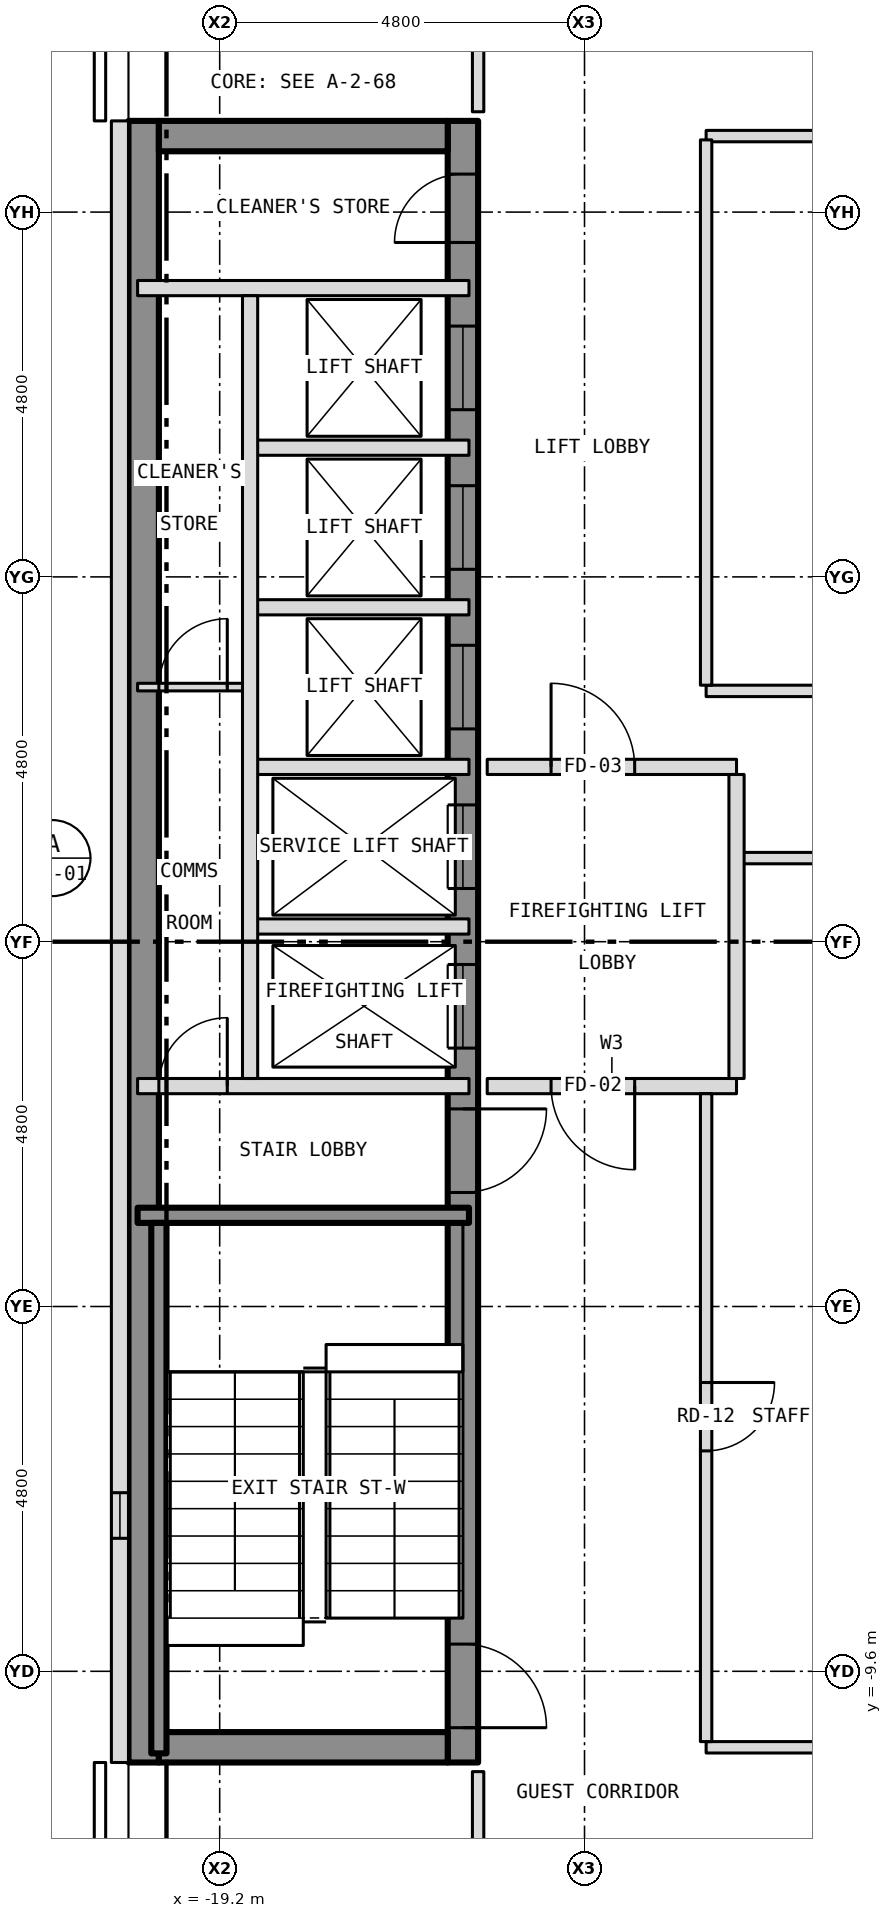
"""IFC4 building model, lengths in metres.
Left out: names, types, materials, properties, quantities, classifications, styles, units other than length and angle.
Written with IfcOpenShell. Run it as: python <this file> out.ifc"""

import sys

from ifc_helpers import new_model, si_unit, direction, frame, frame_2d, origin, place, context, subcontext, project, spatial, rectangle, extrude, element, fill, save


model = new_model("IFC4")
c1 = context("Model", 3, precision=1e-05, world=origin(), true_north=direction((0.0, 1.0)))
c2 = subcontext(c1, "Body", "Model", "MODEL_VIEW")
j1 = project(units=[si_unit("LENGTHUNIT", "METRE"), si_unit("PLANEANGLEUNIT", "RADIAN")], contexts=[c1])
p1 = place(None, origin())
s1 = spatial("IfcSite", under=j1, at=p1, CompositionType="ELEMENT")
p2 = place(p1, origin())
s2 = spatial("IfcBuilding", under=s1, at=p2, CompositionType="ELEMENT")
p3 = place(p2, frame((0.0, 0.0, 248.0)))
s3 = spatial("IfcBuildingStorey", under=s2, at=p3, CompositionType="ELEMENT", Elevation=248.0)
p4 = place(p3, frame((-16.0, -10.8, 0.0), z_axis=(0.0, 0.0, 1.0), x_axis=(0.0, 1.0, 0.0)))
e1 = element("IfcWall", 1, at=p4, inside=s3, PredefinedType="SHEAR", context=c2, shape_type="SweptSolid", body=[
    extrude(rectangle(XDim=21.6, YDim=0.4, at=frame_2d((10.8, 0.0))), origin(), (0.0, 0.0, 1.0), 3.25),
])
p5 = place(p4, frame((9.4, 0.0, 0.0)))
e2 = element("IfcOpeningElement", 2, at=p5, cuts=e1, PredefinedType="OPENING", context=c2, shape_type="SweptSolid", body=[
    extrude(rectangle(XDim=1.1, YDim=2.1, at=frame_2d((0.55, 1.05))), frame((0.0, 0.212, 0.0), z_axis=(0.0, -1.0, 0.0), x_axis=(1.0, 0.0, 0.0)), (0.0, 0.0, 1.0), 0.424),
])
p6 = place(p4, frame((11.5, 0.0, 0.0)))
e3 = element("IfcOpeningElement", 3, at=p6, cuts=e1, PredefinedType="OPENING", context=c2, shape_type="SweptSolid", body=[
    extrude(rectangle(XDim=1.1, YDim=2.1, at=frame_2d((0.55, 1.05))), frame((0.0, 0.212, 0.0), z_axis=(0.0, -1.0, 0.0), x_axis=(1.0, 0.0, 0.0)), (0.0, 0.0, 1.0), 0.424),
])
p7 = place(p4, frame((13.6, 0.0, 0.0)))
e4 = element("IfcOpeningElement", 4, at=p7, cuts=e1, PredefinedType="OPENING", context=c2, shape_type="SweptSolid", body=[
    extrude(rectangle(XDim=1.1, YDim=2.1, at=frame_2d((0.55, 1.05))), frame((0.0, 0.212, 0.0), z_axis=(0.0, -1.0, 0.0), x_axis=(1.0, 0.0, 0.0)), (0.0, 0.0, 1.0), 0.424),
])
p8 = place(p4, frame((15.7, 0.0, 0.0)))
e5 = element("IfcOpeningElement", 5, at=p8, cuts=e1, PredefinedType="OPENING", context=c2, shape_type="SweptSolid", body=[
    extrude(rectangle(XDim=1.1, YDim=2.1, at=frame_2d((0.55, 1.05))), frame((0.0, 0.212, 0.0), z_axis=(0.0, -1.0, 0.0), x_axis=(1.0, 0.0, 0.0)), (0.0, 0.0, 1.0), 0.424),
])
p9 = place(p4, frame((17.8, 0.0, 0.0)))
e6 = element("IfcOpeningElement", 6, at=p9, cuts=e1, PredefinedType="OPENING", context=c2, shape_type="SweptSolid", body=[
    extrude(rectangle(XDim=1.1, YDim=2.1, at=frame_2d((0.55, 1.05))), frame((0.0, 0.212, 0.0), z_axis=(0.0, -1.0, 0.0), x_axis=(1.0, 0.0, 0.0)), (0.0, 0.0, 1.0), 0.424),
])
p10 = place(p4, frame((0.458, 0.0, 0.0)))
e7 = element("IfcOpeningElement", 7, at=p10, cuts=e1, PredefinedType="OPENING", context=c2, shape_type="SweptSolid", body=[
    extrude(rectangle(XDim=1.1, YDim=2.1, at=frame_2d((0.55, 1.05))), frame((0.0, 0.212, 0.0), z_axis=(0.0, -1.0, 0.0), x_axis=(1.0, 0.0, 0.0)), (0.0, 0.0, 1.0), 0.424),
])
p11 = place(p4, frame((7.5, 0.0, 0.0)))
e8 = element("IfcOpeningElement", 8, at=p11, cuts=e1, PredefinedType="OPENING", context=c2, shape_type="SweptSolid", body=[
    extrude(rectangle(XDim=1.1, YDim=2.1, at=frame_2d((0.55, 1.05))), frame((0.0, 0.212, 0.0), z_axis=(0.0, -1.0, 0.0), x_axis=(1.0, 0.0, 0.0)), (0.0, 0.0, 1.0), 0.424),
])
p12 = place(p4, frame((20.0, 0.0, 0.0)))
e9 = element("IfcOpeningElement", 9, at=p12, cuts=e1, PredefinedType="OPENING", context=c2, shape_type="SweptSolid", body=[
    extrude(rectangle(XDim=0.9, YDim=2.1, at=frame_2d((0.45, 1.05))), frame((0.0, 0.212, 0.0), z_axis=(0.0, -1.0, 0.0), x_axis=(1.0, 0.0, 0.0)), (0.0, 0.0, 1.0), 0.424),
])
p13 = place(p3, frame((-20.2, -10.8, 0.0), z_axis=(0.0, 0.0, 1.0), x_axis=(0.0, 1.0, 0.0)))
e10 = element("IfcWall", 10, at=p13, inside=s3, PredefinedType="SHEAR", context=c2, shape_type="SweptSolid", body=[
    extrude(rectangle(XDim=21.6, YDim=0.4, at=frame_2d((10.8, 0.0))), origin(), (0.0, 0.0, 1.0), 3.25),
])
for number, where, z_axis, x_axis in (
    (11, (-20.0, 10.6, 0.0), (0.0, 0.0, 1.0), (1.0, 0.0, 0.0)),
    (12, (-20.0, -10.6, 0.0), (0.0, 0.0, 1.0), (1.0, 0.0, 0.0)),
):
    element("IfcWall", number, at=place(p3, frame(where, z_axis=z_axis, x_axis=x_axis)), inside=s3, PredefinedType="SHEAR", context=c2, shape_type="SweptSolid", body=[
        extrude(rectangle(XDim=3.8, YDim=0.4, at=frame_2d((1.9, 0.0))), origin(), (0.0, 0.0, 1.0), 3.25),
    ])
p14 = place(p3, frame((-20.512, 10.8, 0.0), z_axis=(0.0, 0.0, 1.0), x_axis=(0.0, -1.0, 0.0)))
e13 = element("IfcWall", 13, at=p14, inside=s3, PredefinedType="SOLIDWALL", context=c2, shape_type="SweptSolid", body=[
    extrude(rectangle(XDim=21.6, YDim=0.225, at=frame_2d((10.8, 0.0))), origin(), (0.0, 0.0, 1.0), 3.5),
])
p15 = place(p14, frame((18.05, 0.0, 1.0)))
e14 = element("IfcOpeningElement", 14, at=p15, cuts=e13, PredefinedType="OPENING", context=c2, shape_type="SweptSolid", body=[
    extrude(rectangle(XDim=0.6, YDim=1.5, at=frame_2d((0.3, 0.75))), frame((0.0, 0.125, 0.0), z_axis=(0.0, -1.0, 0.0), x_axis=(1.0, 0.0, 0.0)), (0.0, 0.0, 1.0), 0.249),
])
p16 = place(p3, frame((-12.8, -10.6, 0.0), z_axis=(0.0, 0.0, 1.0), x_axis=(1.0, 0.0, 0.0)))
e15 = element("IfcWall", 15, at=p16, inside=s3, PredefinedType="PARTITIONING", context=c2, shape_type="SweptSolid", body=[
    extrude(rectangle(XDim=20.3, YDim=0.15, at=frame_2d((10.15, 0.0))), origin(), (0.0, 0.0, 1.0), 3.35),
])
p17 = place(p16, frame((11.3, 0.0, 0.0)))
e16 = element("IfcOpeningElement", 16, at=p17, cuts=e15, PredefinedType="OPENING", context=c2, shape_type="SweptSolid", body=[
    extrude(rectangle(XDim=0.9, YDim=2.1, at=frame_2d((0.45, 1.05))), frame((0.0, 0.087, 0.0), z_axis=(0.0, -1.0, 0.0), x_axis=(1.0, 0.0, 0.0)), (0.0, 0.0, 1.0), 0.174),
])
p18 = place(p3, frame((-20.28, -3.6, 0.0), z_axis=(0.0, 0.0, 1.0), x_axis=(1.0, 0.0, 0.0)))
e17 = element("IfcWall", 17, at=p18, inside=s3, PredefinedType="SHEAR", context=c2, shape_type="SweptSolid", body=[
    extrude(rectangle(XDim=4.36, YDim=0.2, at=frame_2d((2.18, 0.0))), origin(), (0.0, 0.0, 1.0), 3.25),
])
p19 = place(p3, frame((-20.28, -1.9, 0.0), z_axis=(0.0, 0.0, 1.0), x_axis=(1.0, 0.0, 0.0)))
e18 = element("IfcWall", 18, at=p19, inside=s3, PredefinedType="PARTITIONING", context=c2, shape_type="SweptSolid", body=[
    extrude(rectangle(XDim=4.36, YDim=0.2, at=frame_2d((2.18, 0.0))), origin(), (0.0, 0.0, 1.0), 3.25),
])
p20 = place(p19, frame((0.28, 0.0, 0.0)))
e19 = element("IfcOpeningElement", 19, at=p20, cuts=e18, PredefinedType="OPENING", context=c2, shape_type="SweptSolid", body=[
    extrude(rectangle(XDim=0.9, YDim=2.1, at=frame_2d((0.45, 1.05))), frame((0.0, 0.112, 0.0), z_axis=(0.0, -1.0, 0.0), x_axis=(1.0, 0.0, 0.0)), (0.0, 0.0, 1.0), 0.224),
])
p21 = place(p3, frame((-15.68, -1.9, 0.0), z_axis=(0.0, 0.0, 1.0), x_axis=(1.0, 0.0, 0.0)))
e20 = element("IfcWall", 20, at=p21, inside=s3, PredefinedType="PARTITIONING", context=c2, shape_type="SweptSolid", body=[
    extrude(rectangle(XDim=3.28, YDim=0.2, at=frame_2d((1.64, 0.0))), origin(), (0.0, 0.0, 1.0), 3.35),
])
p22 = place(p21, frame((0.84, 0.0, 0.0)))
e21 = element("IfcOpeningElement", 21, at=p22, cuts=e20, PredefinedType="OPENING", context=c2, shape_type="SweptSolid", body=[
    extrude(rectangle(XDim=1.1, YDim=2.1, at=frame_2d((0.55, 1.05))), frame((0.0, 0.112, 0.0), z_axis=(0.0, -1.0, 0.0), x_axis=(1.0, 0.0, 0.0)), (0.0, 0.0, 1.0), 0.224),
])
p23 = place(p3, frame((-18.8, 0.2, 0.0), z_axis=(0.0, 0.0, 1.0), x_axis=(1.0, 0.0, 0.0)))
e22 = element("IfcWall", 22, at=p23, inside=s3, PredefinedType="PARTITIONING", context=c2, shape_type="SweptSolid", body=[
    extrude(rectangle(XDim=2.88, YDim=0.2, at=frame_2d((1.44, 0.0))), origin(), (0.0, 0.0, 1.0), 3.25),
])
p24 = place(p3, frame((-12.4, 1.1, 0.0), z_axis=(0.0, 0.0, 1.0), x_axis=(1.0, 0.0, 0.0)))
e23 = element("IfcWall", 23, at=p24, inside=s3, PredefinedType="PARTITIONING", context=c2, shape_type="SweptSolid", body=[
    extrude(rectangle(XDim=19.9, YDim=0.15, at=frame_2d((9.95, 0.0))), origin(), (0.0, 0.0, 1.0), 3.35),
])
p25 = place(p3, frame((-18.8, 2.3, 0.0), z_axis=(0.0, 0.0, 1.0), x_axis=(1.0, 0.0, 0.0)))
e24 = element("IfcWall", 24, at=p25, inside=s3, PredefinedType="PARTITIONING", context=c2, shape_type="SweptSolid", body=[
    extrude(rectangle(XDim=2.88, YDim=0.2, at=frame_2d((1.44, 0.0))), origin(), (0.0, 0.0, 1.0), 3.25),
])
p26 = place(p3, frame((-15.68, 2.3, 0.0), z_axis=(0.0, 0.0, 1.0), x_axis=(1.0, 0.0, 0.0)))
e25 = element("IfcWall", 25, at=p26, inside=s3, PredefinedType="PARTITIONING", context=c2, shape_type="SweptSolid", body=[
    extrude(rectangle(XDim=3.28, YDim=0.2, at=frame_2d((1.64, 0.0))), origin(), (0.0, 0.0, 1.0), 3.35),
])
p27 = place(p26, frame((0.84, 0.0, 0.0)))
e26 = element("IfcOpeningElement", 26, at=p27, cuts=e25, PredefinedType="OPENING", context=c2, shape_type="SweptSolid", body=[
    extrude(rectangle(XDim=1.1, YDim=2.1, at=frame_2d((0.55, 1.05))), frame((0.0, 0.112, 0.0), z_axis=(0.0, -1.0, 0.0), x_axis=(1.0, 0.0, 0.0)), (0.0, 0.0, 1.0), 0.224),
])
p28 = place(p3, frame((-12.8, 3.3, 0.0), z_axis=(0.0, 0.0, 1.0), x_axis=(1.0, 0.0, 0.0)))
e27 = element("IfcWall", 27, at=p28, inside=s3, PredefinedType="PARTITIONING", context=c2, shape_type="SweptSolid", body=[
    extrude(rectangle(XDim=20.3, YDim=0.15, at=frame_2d((10.15, 0.0))), origin(), (0.0, 0.0, 1.0), 3.35),
])
p29 = place(p28, frame((16.1, 0.0, 0.0)))
e28 = element("IfcOpeningElement", 28, at=p29, cuts=e27, PredefinedType="OPENING", context=c2, shape_type="SweptSolid", body=[
    extrude(rectangle(XDim=0.9, YDim=2.1, at=frame_2d((0.45, 1.05))), frame((0.0, 0.087, 0.0), z_axis=(0.0, -1.0, 0.0), x_axis=(1.0, 0.0, 0.0)), (0.0, 0.0, 1.0), 0.174),
])
p30 = place(p3, frame((-20.28, 3.35, 0.0), z_axis=(0.0, 0.0, 1.0), x_axis=(1.0, 0.0, 0.0)))
e29 = element("IfcWall", 29, at=p30, inside=s3, PredefinedType="PARTITIONING", context=c2, shape_type="SweptSolid", body=[
    extrude(rectangle(XDim=1.48, YDim=0.1, at=frame_2d((0.74, 0.0))), origin(), (0.0, 0.0, 1.0), 3.25),
])
p31 = place(p30, frame((0.28, 0.0, 0.0)))
e30 = element("IfcOpeningElement", 30, at=p31, cuts=e29, PredefinedType="OPENING", context=c2, shape_type="SweptSolid", body=[
    extrude(rectangle(XDim=0.9, YDim=2.1, at=frame_2d((0.45, 1.05))), frame((0.0, 0.062, 0.0), z_axis=(0.0, -1.0, 0.0), x_axis=(1.0, 0.0, 0.0)), (0.0, 0.0, 1.0), 0.124),
])
for number, where, z_axis, x_axis in (
    (31, (-18.8, 4.4, 0.0), (0.0, 0.0, 1.0), (1.0, 0.0, 0.0)),
    (32, (-18.8, 6.5, 0.0), (0.0, 0.0, 1.0), (1.0, 0.0, 0.0)),
):
    element("IfcWall", number, at=place(p3, frame(where, z_axis=z_axis, x_axis=x_axis)), inside=s3, PredefinedType="PARTITIONING", context=c2, shape_type="SweptSolid", body=[
        extrude(rectangle(XDim=2.88, YDim=0.2, at=frame_2d((1.44, 0.0))), origin(), (0.0, 0.0, 1.0), 3.25),
    ])
p32 = place(p3, frame((-20.28, 8.6, 0.0), z_axis=(0.0, 0.0, 1.0), x_axis=(1.0, 0.0, 0.0)))
e33 = element("IfcWall", 33, at=p32, inside=s3, PredefinedType="PARTITIONING", context=c2, shape_type="SweptSolid", body=[
    extrude(rectangle(XDim=4.36, YDim=0.2, at=frame_2d((2.18, 0.0))), origin(), (0.0, 0.0, 1.0), 3.25),
])
p33 = place(p3, frame((-12.8, 10.6, 0.0), z_axis=(0.0, 0.0, 1.0), x_axis=(1.0, 0.0, 0.0)))
e34 = element("IfcWall", 34, at=p33, inside=s3, PredefinedType="PARTITIONING", context=c2, shape_type="SweptSolid", body=[
    extrude(rectangle(XDim=20.3, YDim=0.15, at=frame_2d((10.15, 0.0))), origin(), (0.0, 0.0, 1.0), 3.35),
])
p34 = place(p33, frame((5.95, 0.0, 0.0)))
e35 = element("IfcOpeningElement", 35, at=p34, cuts=e34, PredefinedType="OPENING", context=c2, shape_type="SweptSolid", body=[
    extrude(rectangle(XDim=0.9, YDim=2.1, at=frame_2d((0.45, 1.05))), frame((0.0, 0.087, 0.0), z_axis=(0.0, -1.0, 0.0), x_axis=(1.0, 0.0, 0.0)), (0.0, 0.0, 1.0), 0.174),
])
p35 = place(p3, frame((-20.0, -10.68, 0.0), z_axis=(0.0, 0.0, 1.0), x_axis=(0.0, 1.0, 0.0)))
e36 = element("IfcWall", 36, at=p35, inside=s3, PredefinedType="SHEAR", context=c2, shape_type="SweptSolid", body=[
    extrude(rectangle(XDim=6.98, YDim=0.2, at=frame_2d((3.49, 0.0))), origin(), (0.0, 0.0, 1.0), 3.25),
])
p36 = place(p3, frame((-18.8, -1.8, 0.0), z_axis=(0.0, 0.0, 1.0), x_axis=(0.0, 1.0, 0.0)))
e37 = element("IfcWall", 37, at=p36, inside=s3, PredefinedType="PARTITIONING", context=c2, shape_type="SweptSolid", body=[
    extrude(rectangle(XDim=10.3, YDim=0.2, at=frame_2d((5.15, 0.0))), origin(), (0.0, 0.0, 1.0), 3.25),
])
for number, where, z_axis, x_axis in (
    (38, (-15.8, -12.725, 0.0), (0.0, 0.0, 1.0), (0.0, 1.0, 0.0)),
    (39, (-15.8, 10.92, 0.0), (0.0, 0.0, 1.0), (0.0, 1.0, 0.0)),
):
    element("IfcWall", number, at=place(p3, frame(where, z_axis=z_axis, x_axis=x_axis)), inside=s3, PredefinedType="PARTITIONING", context=c2, shape_type="SweptSolid", body=[
        extrude(rectangle(XDim=1.805, YDim=0.15, at=frame_2d((0.903, 0.0))), origin(), (0.0, 0.0, 1.0), 3.35),
    ])
p37 = place(p3, frame((-12.8, -10.525, 0.0), z_axis=(0.0, 0.0, 1.0), x_axis=(0.0, 1.0, 0.0)))
e40 = element("IfcWall", 40, at=p37, inside=s3, PredefinedType="PARTITIONING", context=c2, shape_type="SweptSolid", body=[
    extrude(rectangle(XDim=8.525, YDim=0.15, at=frame_2d((4.262, 0.0))), origin(), (0.0, 0.0, 1.0), 3.35),
])
p38 = place(p37, frame((3.825, 0.0, 0.0)))
e41 = element("IfcOpeningElement", 41, at=p38, cuts=e40, PredefinedType="OPENING", context=c2, shape_type="SweptSolid", body=[
    extrude(rectangle(XDim=0.9, YDim=2.1, at=frame_2d((0.45, 1.05))), frame((0.0, 0.087, 0.0), z_axis=(0.0, -1.0, 0.0), x_axis=(1.0, 0.0, 0.0)), (0.0, 0.0, 1.0), 0.174),
])
p39 = place(p3, frame((-12.8, 3.375, 0.0), z_axis=(0.0, 0.0, 1.0), x_axis=(0.0, 1.0, 0.0)))
e42 = element("IfcWall", 42, at=p39, inside=s3, PredefinedType="PARTITIONING", context=c2, shape_type="SweptSolid", body=[
    extrude(rectangle(XDim=7.175, YDim=0.15, at=frame_2d((3.587, 0.0))), origin(), (0.0, 0.0, 1.0), 3.35),
])
p40 = place(p3, frame((-12.4, -1.8, 0.0), z_axis=(0.0, 0.0, 1.0), x_axis=(0.0, 1.0, 0.0)))
e43 = element("IfcWall", 43, at=p40, inside=s3, PredefinedType="PARTITIONING", context=c2, shape_type="SweptSolid", body=[
    extrude(rectangle(XDim=4.0, YDim=0.2, at=frame_2d((2.0, 0.0))), origin(), (0.0, 0.0, 1.0), 3.35),
])
p41 = place(p15, origin())
e44 = element("IfcWindow", 44, at=p41, inside=s3, PartitioningType="SINGLE_PANEL", PredefinedType="WINDOW", context=c2, shape_type="SweptSolid", body=[
    extrude(rectangle(XDim=0.6, YDim=1.5, at=frame_2d((0.3, 0.75))), frame((0.0, -0.022, 0.0), z_axis=(0.0, -1.0, 0.0), x_axis=(1.0, 0.0, 0.0)), (0.0, 0.0, 1.0), 0.06),
])
fill(e14, e44)
p42 = place(p5, origin())
e45 = element("IfcDoor", 45, at=p42, inside=s3, OperationType="SLIDING_TO_LEFT", PredefinedType="DOOR", context=c2, shape_type="SweptSolid", body=[
    extrude(rectangle(XDim=1.1, YDim=2.1, at=frame_2d((0.55, 1.05))), frame((0.0, 0.025, 0.0), z_axis=(0.0, -1.0, 0.0), x_axis=(1.0, 0.0, 0.0)), (0.0, 0.0, 1.0), 0.05),
])
fill(e2, e45)
p43 = place(p6, origin())
e46 = element("IfcDoor", 46, at=p43, inside=s3, OperationType="SLIDING_TO_LEFT", PredefinedType="DOOR", context=c2, shape_type="SweptSolid", body=[
    extrude(rectangle(XDim=1.1, YDim=2.1, at=frame_2d((0.55, 1.05))), frame((0.0, 0.025, 0.0), z_axis=(0.0, -1.0, 0.0), x_axis=(1.0, 0.0, 0.0)), (0.0, 0.0, 1.0), 0.05),
])
fill(e3, e46)
p44 = place(p7, origin())
e47 = element("IfcDoor", 47, at=p44, inside=s3, OperationType="SLIDING_TO_LEFT", PredefinedType="DOOR", context=c2, shape_type="SweptSolid", body=[
    extrude(rectangle(XDim=1.1, YDim=2.1, at=frame_2d((0.55, 1.05))), frame((0.0, 0.025, 0.0), z_axis=(0.0, -1.0, 0.0), x_axis=(1.0, 0.0, 0.0)), (0.0, 0.0, 1.0), 0.05),
])
fill(e4, e47)
p45 = place(p8, origin())
e48 = element("IfcDoor", 48, at=p45, inside=s3, OperationType="SLIDING_TO_LEFT", PredefinedType="DOOR", context=c2, shape_type="SweptSolid", body=[
    extrude(rectangle(XDim=1.1, YDim=2.1, at=frame_2d((0.55, 1.05))), frame((0.0, 0.025, 0.0), z_axis=(0.0, -1.0, 0.0), x_axis=(1.0, 0.0, 0.0)), (0.0, 0.0, 1.0), 0.05),
])
fill(e5, e48)
p46 = place(p9, origin())
e49 = element("IfcDoor", 49, at=p46, inside=s3, OperationType="SLIDING_TO_LEFT", PredefinedType="DOOR", context=c2, shape_type="SweptSolid", body=[
    extrude(rectangle(XDim=1.1, YDim=2.1, at=frame_2d((0.55, 1.05))), frame((0.0, 0.025, 0.0), z_axis=(0.0, -1.0, 0.0), x_axis=(1.0, 0.0, 0.0)), (0.0, 0.0, 1.0), 0.05),
])
fill(e6, e49)
p47 = place(p10, origin())
e50 = element("IfcDoor", 50, at=p47, inside=s3, OperationType="SINGLE_SWING_LEFT", PredefinedType="DOOR", context=c2, shape_type="SweptSolid", body=[
    extrude(rectangle(XDim=1.1, YDim=2.1, at=frame_2d((0.55, 1.05))), frame((0.0, 0.025, 0.0), z_axis=(0.0, -1.0, 0.0), x_axis=(1.0, 0.0, 0.0)), (0.0, 0.0, 1.0), 0.05),
])
fill(e7, e50)
p48 = place(p11, origin())
e51 = element("IfcDoor", 51, at=p48, inside=s3, OperationType="SINGLE_SWING_RIGHT", PredefinedType="DOOR", context=c2, shape_type="SweptSolid", body=[
    extrude(rectangle(XDim=1.1, YDim=2.1, at=frame_2d((0.55, 1.05))), frame((0.0, 0.025, 0.0), z_axis=(0.0, -1.0, 0.0), x_axis=(1.0, 0.0, 0.0)), (0.0, 0.0, 1.0), 0.05),
])
fill(e8, e51)
p49 = place(p12, origin())
e52 = element("IfcDoor", 52, at=p49, inside=s3, OperationType="SINGLE_SWING_LEFT", PredefinedType="DOOR", context=c2, shape_type="SweptSolid", body=[
    extrude(rectangle(XDim=0.9, YDim=2.1, at=frame_2d((0.45, 1.05))), frame((0.0, 0.025, 0.0), z_axis=(0.0, -1.0, 0.0), x_axis=(1.0, 0.0, 0.0)), (0.0, 0.0, 1.0), 0.05),
])
fill(e9, e52)
p50 = place(p20, origin())
e53 = element("IfcDoor", 53, at=p50, inside=s3, OperationType="SINGLE_SWING_RIGHT", PredefinedType="DOOR", context=c2, shape_type="SweptSolid", body=[
    extrude(rectangle(XDim=0.9, YDim=2.1, at=frame_2d((0.45, 1.05))), frame((0.0, 0.025, 0.0), z_axis=(0.0, -1.0, 0.0), x_axis=(1.0, 0.0, 0.0)), (0.0, 0.0, 1.0), 0.05),
])
fill(e19, e53)
p51 = place(p31, origin())
e54 = element("IfcDoor", 54, at=p51, inside=s3, OperationType="SINGLE_SWING_RIGHT", PredefinedType="DOOR", context=c2, shape_type="SweptSolid", body=[
    extrude(rectangle(XDim=0.9, YDim=2.1, at=frame_2d((0.45, 1.05))), frame((0.0, 0.025, 0.0), z_axis=(0.0, -1.0, 0.0), x_axis=(1.0, 0.0, 0.0)), (0.0, 0.0, 1.0), 0.05),
])
fill(e30, e54)
p52 = place(p22, origin())
e55 = element("IfcDoor", 55, at=p52, inside=s3, OperationType="SINGLE_SWING_RIGHT", PredefinedType="DOOR", context=c2, shape_type="SweptSolid", body=[
    extrude(rectangle(XDim=1.1, YDim=2.1, at=frame_2d((0.55, 1.05))), frame((0.0, 0.025, 0.0), z_axis=(0.0, -1.0, 0.0), x_axis=(1.0, 0.0, 0.0)), (0.0, 0.0, 1.0), 0.05),
])
fill(e21, e55)
p53 = place(p27, origin())
e56 = element("IfcDoor", 56, at=p53, inside=s3, OperationType="SINGLE_SWING_LEFT", PredefinedType="DOOR", context=c2, shape_type="SweptSolid", body=[
    extrude(rectangle(XDim=1.1, YDim=2.1, at=frame_2d((0.55, 1.05))), frame((0.0, 0.025, 0.0), z_axis=(0.0, -1.0, 0.0), x_axis=(1.0, 0.0, 0.0)), (0.0, 0.0, 1.0), 0.05),
])
fill(e26, e56)
p54 = place(p38, origin())
e57 = element("IfcDoor", 57, at=p54, inside=s3, OperationType="SINGLE_SWING_RIGHT", PredefinedType="DOOR", context=c2, shape_type="SweptSolid", body=[
    extrude(rectangle(XDim=0.9, YDim=2.1, at=frame_2d((0.45, 1.05))), frame((0.0, 0.025, 0.0), z_axis=(0.0, -1.0, 0.0), x_axis=(1.0, 0.0, 0.0)), (0.0, 0.0, 1.0), 0.05),
])
fill(e41, e57)
save(model, sys.argv[1])
